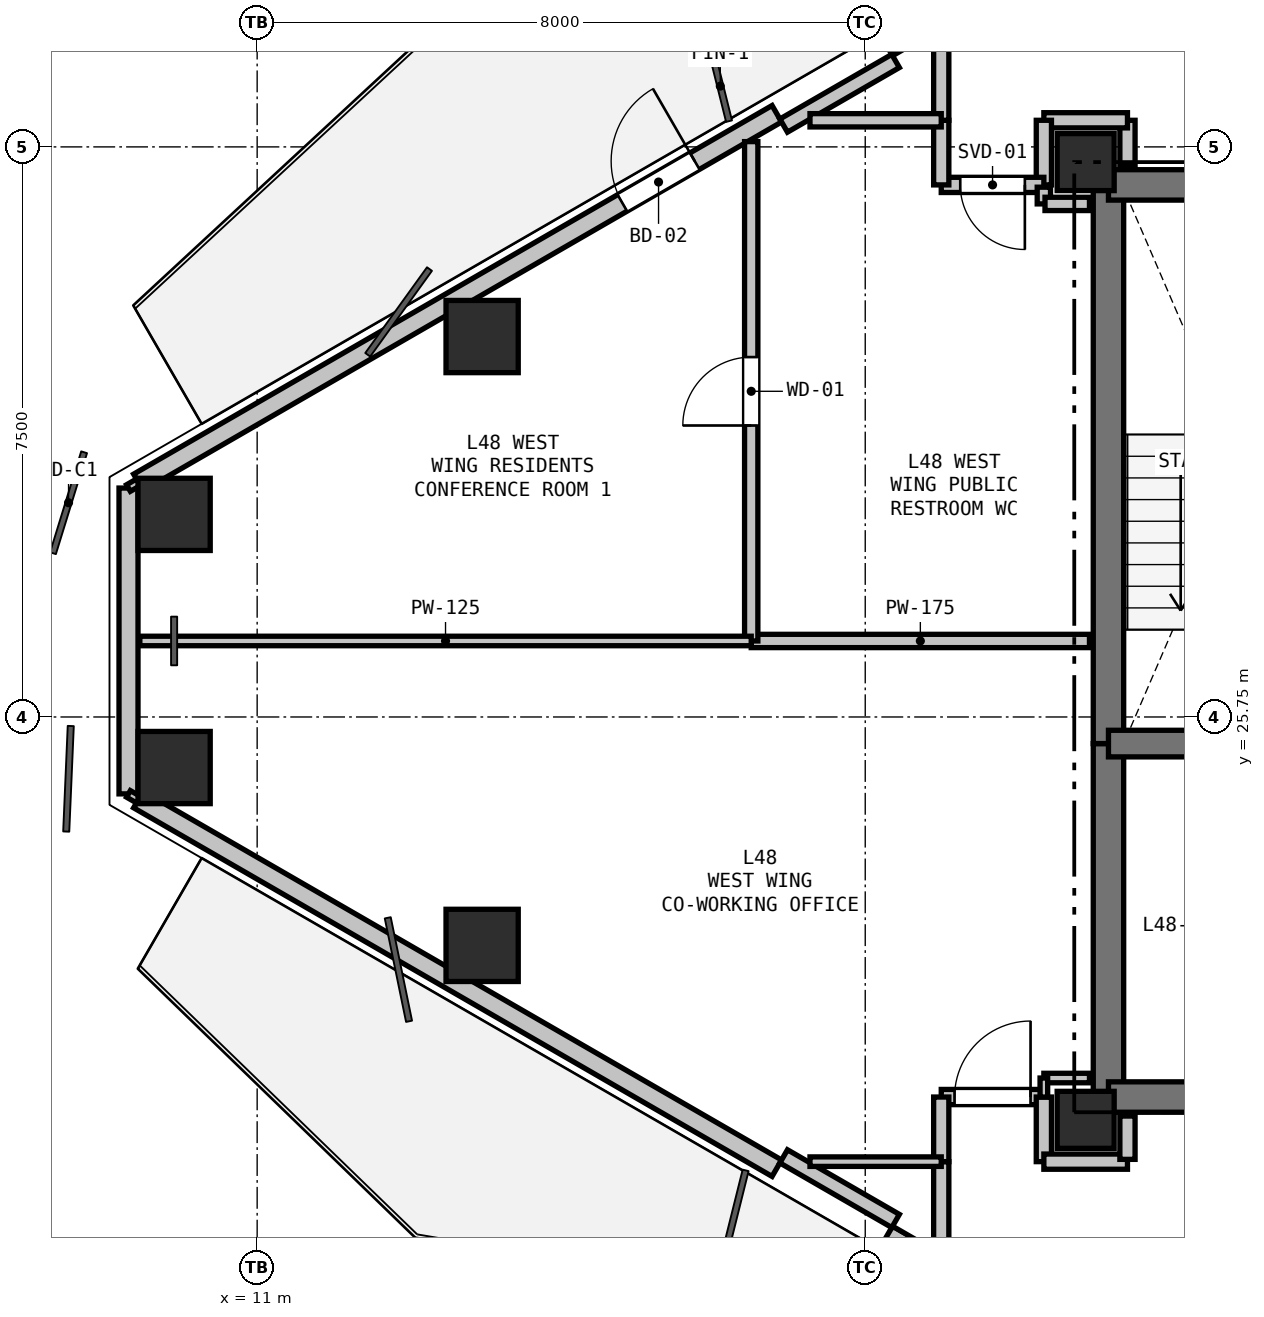
"""IFC4 building model, lengths in metres.
Left out: names, types, materials, properties, quantities, classifications, styles, units other than length and angle.
Written with IfcOpenShell. Run it as: python <this file> out.ifc"""

import sys

from ifc_helpers import new_model, si_unit, direction, frame, frame_2d, origin, origin_2d, place, context, subcontext, project, spatial, rectangle, hollow_rectangle, extrude, element, fill, save


model = new_model("IFC4")
c1 = context("Model", 3, precision=1e-05, world=origin(), true_north=direction((0.0, 1.0)))
c2 = subcontext(c1, "Body", "Model", "MODEL_VIEW")
j1 = project(units=[si_unit("LENGTHUNIT", "METRE"), si_unit("PLANEANGLEUNIT", "RADIAN")], contexts=[c1])
p1 = place(None, origin())
s1 = spatial("IfcSite", under=j1, at=p1, CompositionType="ELEMENT")
p2 = place(p1, origin())
s2 = spatial("IfcBuilding", under=s1, at=p2, CompositionType="ELEMENT")
p3 = place(p2, frame((0.0, 0.0, 175.5)))
s3 = spatial("IfcBuildingStorey", under=s2, at=p3, CompositionType="ELEMENT", Elevation=175.5)
for number, where, z_axis, x_axis in (
    (1, (21.9, 20.45, 0.0), (0.0, 0.0, 1.0), (1.0, 0.0, 0.0)),
    (2, (21.9, 33.05, 0.0), (0.0, 0.0, 1.0), (1.0, 0.0, 0.0)),
):
    element("IfcColumn", number, at=place(p3, frame(where, z_axis=z_axis, x_axis=x_axis)), inside=s3, PredefinedType="COLUMN", context=c2, shape_type="SweptSolid", body=[
        extrude(rectangle(XDim=0.75, YDim=0.75, at=origin_2d()), origin(), (0.0, 0.0, 1.0), 3.3),
    ])
for number, where, z_axis, x_axis in (
    (3, (9.907, 28.415, -0.23), (0.0, 0.0, 1.0), (1.0, 0.0, 0.0)),
    (4, (13.96, 30.755, -0.23), (0.0, 0.0, 1.0), (1.0, 0.0, 0.0)),
    (5, (13.96, 22.745, -0.23), (0.0, 0.0, 1.0), (1.0, 0.0, 0.0)),
    (6, (9.907, 25.085, -0.23), (0.0, 0.0, 1.0), (1.0, 0.0, 0.0)),
):
    element("IfcColumn", number, at=place(p3, frame(where, z_axis=z_axis, x_axis=x_axis)), inside=s3, PredefinedType="COLUMN", context=c2, shape_type="SweptSolid", body=[
        extrude(hollow_rectangle(XDim=0.95, YDim=0.95, WallThickness=0.028, at=origin_2d()), origin(), (0.0, 0.0, 1.0), 3.53),
    ])
p4 = place(p3, frame((9.308, 24.738, 0.0), z_axis=(0.0, 0.0, 1.0), x_axis=(0.0, 1.0, 0.0)))
e7 = element("IfcWall", 7, at=p4, inside=s3, PredefinedType="SOLIDWALL", context=c2, shape_type="SweptSolid", body=[
    extrude(rectangle(XDim=4.023, YDim=0.25, at=frame_2d((2.012, 0.0))), origin(), (0.0, 0.0, 1.0), 2.69),
])
p5 = place(p3, frame((9.438, 28.837, 0.0), z_axis=(0.0, 0.0, 1.0), x_axis=(0.866027133173, 0.499997004599, 0.0)))
e8 = element("IfcWall", 8, at=p5, inside=s3, PredefinedType="SOLIDWALL", context=c2, shape_type="SweptSolid", body=[
    extrude(rectangle(XDim=9.699, YDim=0.25, at=frame_2d((4.849, 0.0))), origin(), (0.0, 0.0, 1.0), 2.69),
])
p6 = place(p5, frame((7.352, 0.0, 0.0)))
e9 = element("IfcOpeningElement", 9, at=p6, cuts=e8, PredefinedType="OPENING", context=c2, shape_type="SweptSolid", body=[
    extrude(rectangle(XDim=1.1, YDim=2.1, at=frame_2d((0.55, 1.05))), frame((0.0, 0.135, 0.0), z_axis=(0.0, -1.0, 0.0), x_axis=(1.0, 0.0, 0.0)), (0.0, 0.0, 1.0), 0.27),
])
p7 = place(p3, frame((19.309, 34.536, 0.0), z_axis=(0.0, 0.0, 1.0), x_axis=(0.866020680503, 0.500008180874, 0.0)))
e10 = element("IfcWall", 10, at=p7, inside=s3, PredefinedType="PARAPET", context=c2, shape_type="SweptSolid", body=[
    extrude(rectangle(XDim=8.999, YDim=0.2, at=frame_2d((4.5, 0.0))), origin(), (0.0, 0.0, 1.0), 0.2),
])
p8 = place(p3, frame((17.927, 33.53, 0.0), z_axis=(0.0, 0.0, 1.0), x_axis=(0.86605165483, 0.499954529098, 0.0)))
e11 = element("IfcWall", 11, at=p8, inside=s3, PredefinedType="PARAPET", context=c2, shape_type="SweptSolid", body=[
    extrude(rectangle(XDim=1.7, YDim=0.2, at=frame_2d((0.85, 0.0))), origin(), (0.0, 0.0, 1.0), 2.69),
])
p9 = place(p3, frame((27.102, 14.464, 0.0), z_axis=(0.0, 0.0, 1.0), x_axis=(-0.866020680503, 0.500008180874, 0.0)))
e12 = element("IfcWall", 12, at=p9, inside=s3, PredefinedType="PARAPET", context=c2, shape_type="SweptSolid", body=[
    extrude(rectangle(XDim=8.999, YDim=0.2, at=frame_2d((4.5, 0.0))), origin(), (0.0, 0.0, 1.0), 0.2),
])
p10 = place(p3, frame((17.837, 19.814, 0.0), z_axis=(0.0, 0.0, 1.0), x_axis=(-0.866027133173, 0.499997004599, 0.0)))
e13 = element("IfcWall", 13, at=p10, inside=s3, PredefinedType="SOLIDWALL", context=c2, shape_type="SweptSolid", body=[
    extrude(rectangle(XDim=9.699, YDim=0.25, at=frame_2d((4.849, 0.0))), origin(), (0.0, 0.0, 1.0), 2.69),
])
p11 = place(p3, frame((19.399, 19.12, 0.0), z_axis=(0.0, 0.0, 1.0), x_axis=(-0.86605165483, 0.499954529098, 0.0)))
e14 = element("IfcWall", 14, at=p11, inside=s3, PredefinedType="PARAPET", context=c2, shape_type="SweptSolid", body=[
    extrude(rectangle(XDim=1.7, YDim=0.2, at=frame_2d((0.85, 0.0))), origin(), (0.0, 0.0, 1.0), 2.69),
])
p12 = place(p3, frame((22.2, 20.75, 0.0), z_axis=(0.0, 0.0, 1.0), x_axis=(0.0, 1.0, 0.0)))
e15 = element("IfcWall", 15, at=p12, inside=s3, PredefinedType="SHEAR", context=c2, shape_type="SweptSolid", body=[
    extrude(rectangle(XDim=4.65, YDim=0.4, at=frame_2d((2.325, 0.0))), origin(), (0.0, 0.0, 1.0), 3.07),
])
p13 = place(p3, frame((22.2, 25.4, 0.0), z_axis=(0.0, 0.0, 1.0), x_axis=(0.0, 1.0, 0.0)))
e16 = element("IfcWall", 16, at=p13, inside=s3, PredefinedType="SHEAR", context=c2, shape_type="SweptSolid", body=[
    extrude(rectangle(XDim=7.35, YDim=0.4, at=frame_2d((3.675, 0.0))), origin(), (0.0, 0.0, 1.0), 3.07),
])
p14 = place(p3, frame((22.2, 32.75, 0.0), z_axis=(0.0, 0.0, 1.0), x_axis=(1.0, 0.0, 0.0)))
e17 = element("IfcWall", 17, at=p14, inside=s3, PredefinedType="SHEAR", context=c2, shape_type="SweptSolid", body=[
    extrude(rectangle(XDim=3.45, YDim=0.4, at=frame_2d((1.725, 0.0))), origin(), (0.0, 0.0, 1.0), 3.07),
])
p15 = place(p3, frame((25.65, 20.75, 0.0), z_axis=(0.0, 0.0, 1.0), x_axis=(-1.0, 0.0, 0.0)))
e18 = element("IfcWall", 18, at=p15, inside=s3, PredefinedType="SHEAR", context=c2, shape_type="SweptSolid", body=[
    extrude(rectangle(XDim=3.45, YDim=0.4, at=frame_2d((1.725, 0.0))), origin(), (0.0, 0.0, 1.0), 3.07),
])
p16 = place(p15, frame((0.65, 0.0, 0.0)))
e19 = element("IfcOpeningElement", 19, at=p16, cuts=e18, PredefinedType="OPENING", context=c2, shape_type="SweptSolid", body=[
    extrude(rectangle(XDim=1.15, YDim=2.15, at=frame_2d((0.575, 1.075))), frame((0.0, 0.21, 0.0), z_axis=(0.0, -1.0, 0.0), x_axis=(1.0, 0.0, 0.0)), (0.0, 0.0, 1.0), 0.42),
])
p17 = place(p3, frame((22.2, 25.4, 0.0), z_axis=(0.0, 0.0, 1.0), x_axis=(1.0, 0.0, 0.0)))
e20 = element("IfcWall", 20, at=p17, inside=s3, PredefinedType="SHEAR", context=c2, shape_type="SweptSolid", body=[
    extrude(rectangle(XDim=3.45, YDim=0.35, at=frame_2d((1.725, 0.0))), origin(), (0.0, 0.0, 1.0), 3.07),
])
p18 = place(p17, frame((1.15, 0.0, 0.0)))
e21 = element("IfcOpeningElement", 21, at=p18, cuts=e20, PredefinedType="OPENING", context=c2, shape_type="SweptSolid", body=[
    extrude(rectangle(XDim=1.15, YDim=2.15, at=frame_2d((0.575, 1.075))), frame((0.0, 0.185, 0.0), z_axis=(0.0, -1.0, 0.0), x_axis=(1.0, 0.0, 0.0)), (0.0, 0.0, 1.0), 0.37),
])
p19 = place(p3, frame((22.45, 33.0, 0.0), z_axis=(0.0, 0.0, 1.0), x_axis=(0.0, 1.0, 0.0)))
e22 = element("IfcWall", 22, at=p19, inside=s3, PredefinedType="PARTITIONING", context=c2, shape_type="SweptSolid", body=[
    extrude(rectangle(XDim=0.6, YDim=0.2, at=frame_2d((0.3, 0.0))), origin(), (0.0, 0.0, 1.0), 2.595),
])
p20 = place(p3, frame((22.45, 33.6, 0.0), z_axis=(0.0, 0.0, 1.0), x_axis=(-1.0, 0.0, 0.0)))
e23 = element("IfcWall", 23, at=p20, inside=s3, PredefinedType="PARTITIONING", context=c2, shape_type="SweptSolid", body=[
    extrude(rectangle(XDim=1.1, YDim=0.2, at=frame_2d((0.55, 0.0))), origin(), (0.0, 0.0, 1.0), 3.07),
])
p21 = place(p3, frame((21.35, 33.6, 0.0), z_axis=(0.0, 0.0, 1.0), x_axis=(0.0, -1.0, 0.0)))
e24 = element("IfcWall", 24, at=p21, inside=s3, PredefinedType="PARTITIONING", context=c2, shape_type="SweptSolid", body=[
    extrude(rectangle(XDim=0.85, YDim=0.2, at=frame_2d((0.425, 0.0))), origin(), (0.0, 0.0, 1.0), 2.518),
])
p22 = place(p3, frame((21.35, 32.75, 0.0), z_axis=(0.0, 0.0, 1.0), x_axis=(-1.0, 0.0, 0.0)))
e25 = element("IfcWall", 25, at=p22, inside=s3, PredefinedType="PARTITIONING", context=c2, shape_type="SweptSolid", body=[
    extrude(rectangle(XDim=1.35, YDim=0.2, at=frame_2d((0.675, 0.0))), origin(), (0.0, 0.0, 1.0), 2.518),
])
p23 = place(p22, frame((0.25, 0.0, 0.0)))
e26 = element("IfcOpeningElement", 26, at=p23, cuts=e25, PredefinedType="OPENING", context=c2, shape_type="SweptSolid", body=[
    extrude(rectangle(XDim=0.85, YDim=2.1, at=frame_2d((0.425, 1.05))), frame((0.0, 0.11, 0.0), z_axis=(0.0, -1.0, 0.0), x_axis=(1.0, 0.0, 0.0)), (0.0, 0.0, 1.0), 0.22),
])
p24 = place(p3, frame((20.0, 32.75, 0.0), z_axis=(0.0, 0.0, 1.0), x_axis=(0.0, 1.0, 0.0)))
e27 = element("IfcWall", 27, at=p24, inside=s3, PredefinedType="PARTITIONING", context=c2, shape_type="SweptSolid", body=[
    extrude(rectangle(XDim=0.85, YDim=0.2, at=frame_2d((0.425, 0.0))), origin(), (0.0, 0.0, 1.0), 3.07),
])
p25 = place(p3, frame((20.0, 33.6, 0.0), z_axis=(0.0, 0.0, 1.0), x_axis=(0.0, 1.0, 0.0)))
e28 = element("IfcWall", 28, at=p25, inside=s3, PredefinedType="PARTITIONING", context=c2, shape_type="SweptSolid", body=[
    extrude(rectangle(XDim=1.291, YDim=0.2, at=frame_2d((0.646, 0.0))), origin(), (0.0, 0.0, 1.0), 2.365),
])
p26 = place(p3, frame((20.0, 20.75, 0.0), z_axis=(0.0, 0.0, 1.0), x_axis=(1.0, 0.0, 0.0)))
e29 = element("IfcWall", 29, at=p26, inside=s3, PredefinedType="PARTITIONING", context=c2, shape_type="SweptSolid", body=[
    extrude(rectangle(XDim=1.35, YDim=0.2, at=frame_2d((0.675, 0.0))), origin(), (0.0, 0.0, 1.0), 2.518),
])
p27 = place(p26, frame((0.175, 0.0, 0.0)))
e30 = element("IfcOpeningElement", 30, at=p27, cuts=e29, PredefinedType="OPENING", context=c2, shape_type="SweptSolid", body=[
    extrude(rectangle(XDim=1.0, YDim=2.15, at=frame_2d((0.5, 1.075))), frame((0.0, 0.11, 0.0), z_axis=(0.0, -1.0, 0.0), x_axis=(1.0, 0.0, 0.0)), (0.0, 0.0, 1.0), 0.22),
])
p28 = place(p3, frame((21.35, 20.75, 0.0), z_axis=(0.0, 0.0, 1.0), x_axis=(0.0, -1.0, 0.0)))
e31 = element("IfcWall", 31, at=p28, inside=s3, PredefinedType="PARTITIONING", context=c2, shape_type="SweptSolid", body=[
    extrude(rectangle(XDim=0.85, YDim=0.2, at=frame_2d((0.425, 0.0))), origin(), (0.0, 0.0, 1.0), 2.518),
])
p29 = place(p3, frame((21.35, 19.9, 0.0), z_axis=(0.0, 0.0, 1.0), x_axis=(1.0, 0.0, 0.0)))
e32 = element("IfcWall", 32, at=p29, inside=s3, PredefinedType="PARTITIONING", context=c2, shape_type="SweptSolid", body=[
    extrude(rectangle(XDim=1.1, YDim=0.2, at=frame_2d((0.55, 0.0))), origin(), (0.0, 0.0, 1.0), 2.518),
])
p30 = place(p3, frame((22.45, 19.93, 0.0), z_axis=(0.0, 0.0, 1.0), x_axis=(0.0, 1.0, 0.0)))
e33 = element("IfcWall", 33, at=p30, inside=s3, PredefinedType="PARTITIONING", context=c2, shape_type="SweptSolid", body=[
    extrude(rectangle(XDim=0.57, YDim=0.2, at=frame_2d((0.285, 0.0))), origin(), (0.0, 0.0, 1.0), 2.518),
])
p31 = place(p3, frame((20.0, 18.609, 0.0), z_axis=(0.0, 0.0, 1.0), x_axis=(0.0, 1.0, 0.0)))
e34 = element("IfcWall", 34, at=p31, inside=s3, PredefinedType="PARTITIONING", context=c2, shape_type="SweptSolid", body=[
    extrude(rectangle(XDim=1.291, YDim=0.2, at=frame_2d((0.646, 0.0))), origin(), (0.0, 0.0, 1.0), 2.365),
])
p32 = place(p3, frame((20.0, 19.9, 0.0), z_axis=(0.0, 0.0, 1.0), x_axis=(0.0, 1.0, 0.0)))
e35 = element("IfcWall", 35, at=p32, inside=s3, PredefinedType="PARTITIONING", context=c2, shape_type="SweptSolid", body=[
    extrude(rectangle(XDim=0.85, YDim=0.2, at=frame_2d((0.425, 0.0))), origin(), (0.0, 0.0, 1.0), 3.07),
])
p33 = place(p3, frame((21.35, 32.72, 0.0), z_axis=(0.0, 0.0, 1.0), x_axis=(0.0, -1.0, 0.0)))
e36 = element("IfcWall", 36, at=p33, inside=s3, PredefinedType="PLUMBINGWALL", context=c2, shape_type="SweptSolid", body=[
    extrude(rectangle(XDim=0.22, YDim=0.175, at=frame_2d((0.11, 0.0))), origin(), (0.0, 0.0, 1.0), 3.07),
])
p34 = place(p3, frame((21.365, 32.5, 0.0), z_axis=(0.0, 0.0, 1.0), x_axis=(1.0, 0.0, 0.0)))
e37 = element("IfcWall", 37, at=p34, inside=s3, PredefinedType="PLUMBINGWALL", context=c2, shape_type="SweptSolid", body=[
    extrude(rectangle(XDim=0.585, YDim=0.175, at=frame_2d((0.292, 0.0))), origin(), (0.0, 0.0, 1.0), 2.595),
])
p35 = place(p3, frame((21.95, 26.75, 0.0), z_axis=(0.0, 0.0, 1.0), x_axis=(-1.0, 0.0, 0.0)))
e38 = element("IfcWall", 38, at=p35, inside=s3, PredefinedType="PLUMBINGWALL", context=c2, shape_type="SweptSolid", body=[
    extrude(rectangle(XDim=4.45, YDim=0.175, at=frame_2d((2.225, 0.0))), origin(), (0.0, 0.0, 1.0), 2.595),
])
p36 = place(p3, frame((17.5, 26.75, 0.0), z_axis=(0.0, 0.0, 1.0), x_axis=(0.0, 1.0, 0.0)))
e39 = element("IfcWall", 39, at=p36, inside=s3, PredefinedType="PLUMBINGWALL", context=c2, shape_type="SweptSolid", body=[
    extrude(rectangle(XDim=6.57, YDim=0.175, at=frame_2d((3.285, 0.0))), origin(), (0.0, 0.0, 1.0), 2.365),
])
p37 = place(p36, frame((2.835, 0.0, 0.0)))
e40 = element("IfcOpeningElement", 40, at=p37, cuts=e39, PredefinedType="OPENING", context=c2, shape_type="SweptSolid", body=[
    extrude(rectangle(XDim=0.9, YDim=2.1, at=frame_2d((0.45, 1.05))), frame((0.0, 0.097, 0.0), z_axis=(0.0, -1.0, 0.0), x_axis=(1.0, 0.0, 0.0)), (0.0, 0.0, 1.0), 0.195),
])
p38 = place(p3, frame((18.273, 33.6, 0.0), z_axis=(0.0, 0.0, 1.0), x_axis=(1.0, 0.0, 0.0)))
e41 = element("IfcWall", 41, at=p38, inside=s3, PredefinedType="PLUMBINGWALL", context=c2, shape_type="SweptSolid", body=[
    extrude(rectangle(XDim=1.727, YDim=0.175, at=frame_2d((0.863, 0.0))), origin(), (0.0, 0.0, 1.0), 2.365),
])
p39 = place(p3, frame((17.5, 26.75, 0.0), z_axis=(0.0, 0.0, 1.0), x_axis=(-1.0, 0.0, 0.0)))
e42 = element("IfcWall", 42, at=p39, inside=s3, PredefinedType="PARTITIONING", context=c2, shape_type="SweptSolid", body=[
    extrude(rectangle(XDim=8.043, YDim=0.125, at=frame_2d((4.022, 0.0))), origin(), (0.0, 0.0, 1.0), 2.735),
])
p40 = place(p3, frame((9.307, 28.762, 0.0), z_axis=(0.0, 0.0, 1.0), x_axis=(0.865833797362, 0.500331725305, 0.0)))
e43 = element("IfcWall", 43, at=p40, inside=s3, PredefinedType="PARTITIONING", context=c2, shape_type="SweptSolid", body=[
    extrude(rectangle(XDim=0.15, YDim=0.1, at=frame_2d((0.075, 0.0))), origin(), (0.0, 0.0, 1.0), 3.07),
])
p41 = place(p3, frame((21.95, 21.0, 0.0), z_axis=(0.0, 0.0, 1.0), x_axis=(-1.0, 0.0, 0.0)))
e44 = element("IfcWall", 44, at=p41, inside=s3, PredefinedType="PARTITIONING", context=c2, shape_type="SweptSolid", body=[
    extrude(rectangle(XDim=0.6, YDim=0.125, at=frame_2d((0.3, 0.0))), origin(), (0.0, 0.0, 1.0), 2.595),
])
p42 = place(p3, frame((21.35, 21.0, 0.0), z_axis=(0.0, 0.0, 1.0), x_axis=(0.0, -1.0, 0.0)))
e45 = element("IfcWall", 45, at=p42, inside=s3, PredefinedType="PARTITIONING", context=c2, shape_type="SweptSolid", body=[
    extrude(rectangle(XDim=0.25, YDim=0.1, at=frame_2d((0.125, 0.0))), origin(), (0.0, 0.0, 1.0), 2.518),
])
p43 = place(p3, frame((20.0, 19.9, 0.0), z_axis=(0.0, 0.0, 1.0), x_axis=(-1.0, 0.0, 0.0)))
e46 = element("IfcWall", 46, at=p43, inside=s3, PredefinedType="PARTITIONING", context=c2, shape_type="SweptSolid", body=[
    extrude(rectangle(XDim=1.727, YDim=0.125, at=frame_2d((0.863, 0.0))), origin(), (0.0, 0.0, 1.0), 2.365),
])
p44 = place(p3, frame((9.437, 24.663, 0.0), z_axis=(0.0, 0.0, 1.0), x_axis=(-0.866239593359, 0.499628829129, 0.0)))
e47 = element("IfcWall", 47, at=p44, inside=s3, PredefinedType="PARTITIONING", context=c2, shape_type="SweptSolid", body=[
    extrude(rectangle(XDim=0.15, YDim=0.1, at=frame_2d((0.075, 0.0))), origin(), (0.0, 0.0, 1.0), 3.07),
])
p45 = place(p6, origin())
e48 = element("IfcDoor", 48, at=p45, inside=s3, OperationType="SINGLE_SWING_RIGHT", PredefinedType="DOOR", context=c2, shape_type="SweptSolid", body=[
    extrude(rectangle(XDim=1.1, YDim=2.1, at=frame_2d((0.55, 1.05))), frame((0.0, 0.025, 0.0), z_axis=(0.0, -1.0, 0.0), x_axis=(1.0, 0.0, 0.0)), (0.0, 0.0, 1.0), 0.05),
])
fill(e9, e48)
p46 = place(p23, origin())
e49 = element("IfcDoor", 49, at=p46, inside=s3, OperationType="SINGLE_SWING_LEFT", PredefinedType="DOOR", context=c2, shape_type="SweptSolid", body=[
    extrude(rectangle(XDim=0.85, YDim=2.1, at=frame_2d((0.425, 1.05))), frame((0.0, 0.025, 0.0), z_axis=(0.0, -1.0, 0.0), x_axis=(1.0, 0.0, 0.0)), (0.0, 0.0, 1.0), 0.05),
])
fill(e26, e49)
p47 = place(p27, origin())
e50 = element("IfcDoor", 50, at=p47, inside=s3, OperationType="SINGLE_SWING_RIGHT", PredefinedType="DOOR", context=c2, shape_type="SweptSolid", body=[
    extrude(rectangle(XDim=1.0, YDim=2.15, at=frame_2d((0.5, 1.075))), frame((0.0, 0.025, 0.0), z_axis=(0.0, -1.0, 0.0), x_axis=(1.0, 0.0, 0.0)), (0.0, 0.0, 1.0), 0.05),
])
fill(e30, e50)
p48 = place(p37, origin())
e51 = element("IfcDoor", 51, at=p48, inside=s3, OperationType="SINGLE_SWING_LEFT", PredefinedType="DOOR", context=c2, shape_type="SweptSolid", body=[
    extrude(rectangle(XDim=0.9, YDim=2.1, at=frame_2d((0.45, 1.05))), frame((0.0, 0.025, 0.0), z_axis=(0.0, -1.0, 0.0), x_axis=(1.0, 0.0, 0.0)), (0.0, 0.0, 1.0), 0.05),
])
fill(e40, e51)
save(model, sys.argv[1])
